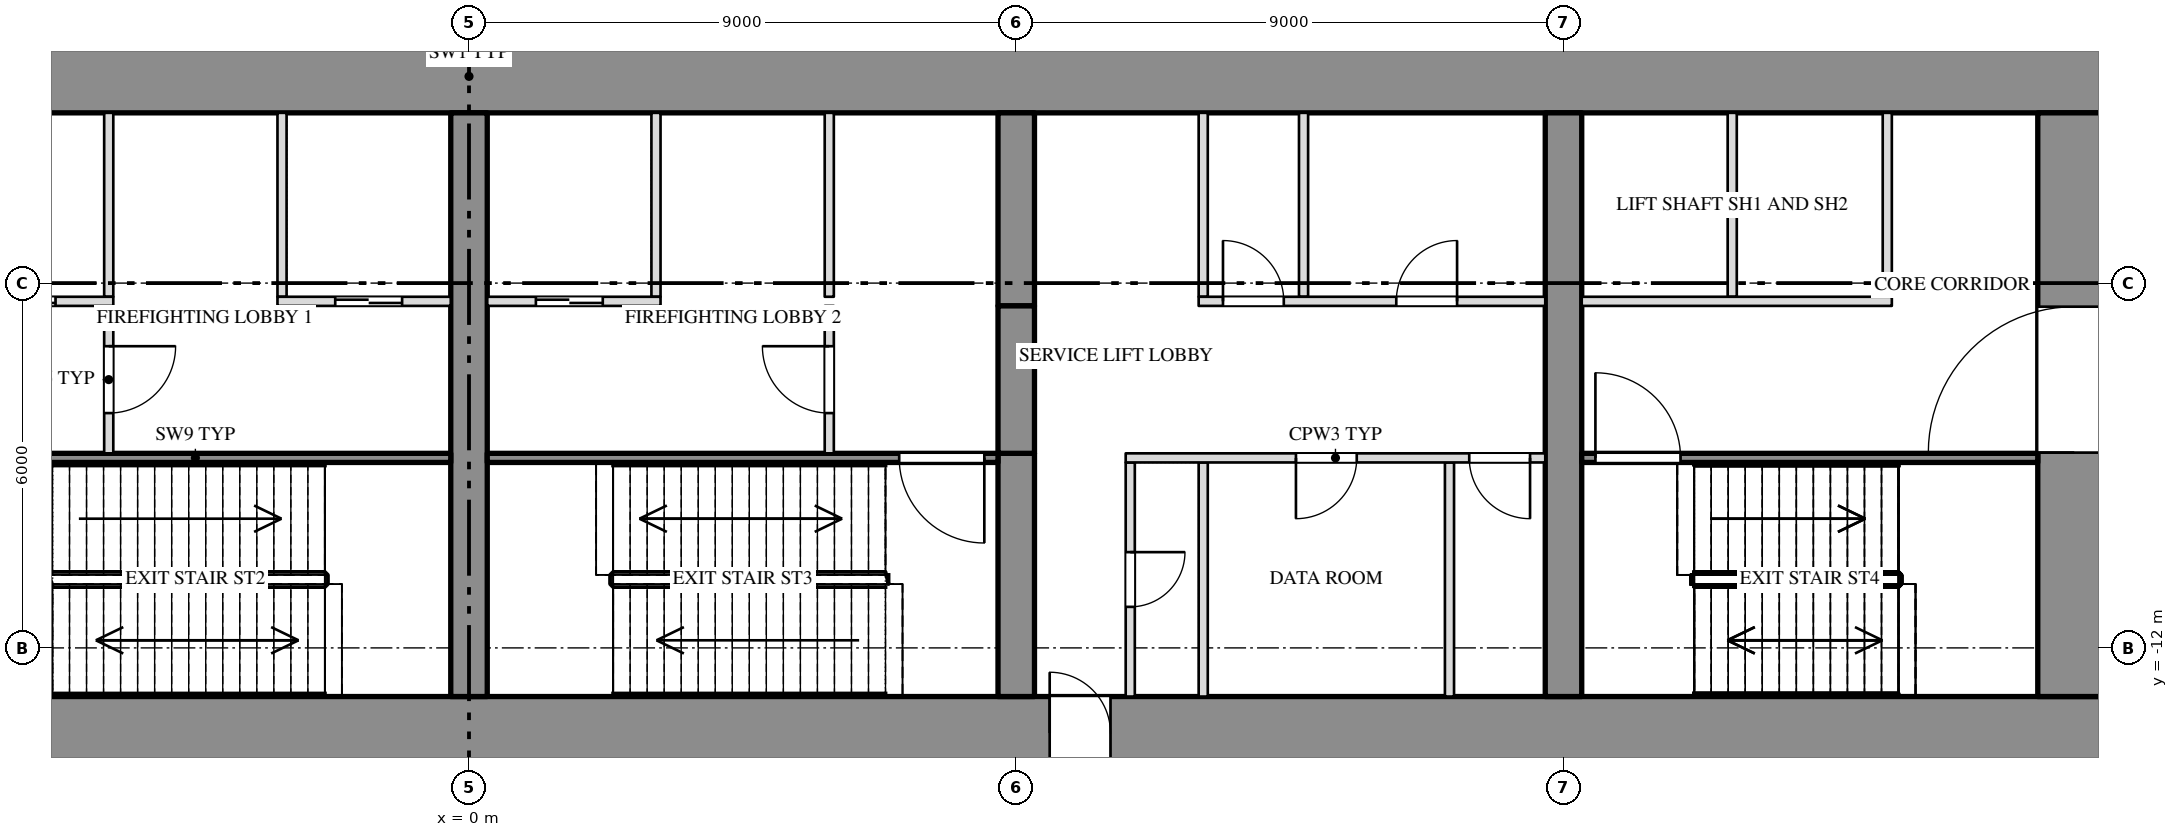
"""IFC4 building model, lengths in metres.
Left out: names, types, materials, properties, quantities, classifications, styles, units other than length and angle.
Written with IfcOpenShell. Run it as: python <this file> out.ifc"""

import sys

from ifc_helpers import new_model, si_unit, direction, frame, frame_2d, origin, place, context, subcontext, project, spatial, rectangle, extrude, element, fill, save


model = new_model("IFC4")
c1 = context("Model", 3, precision=1e-05, world=origin(), true_north=direction((0.0, 1.0)))
c2 = subcontext(c1, "Body", "Model", "MODEL_VIEW")
j1 = project(units=[si_unit("LENGTHUNIT", "METRE"), si_unit("PLANEANGLEUNIT", "RADIAN")], contexts=[c1])
p1 = place(None, origin())
s1 = spatial("IfcSite", under=j1, at=p1, CompositionType="ELEMENT")
p2 = place(p1, origin())
s2 = spatial("IfcBuilding", under=s1, at=p2, CompositionType="ELEMENT")
p3 = place(p2, frame((0.0, 0.0, 15.0)))
s3 = spatial("IfcBuildingStorey", under=s2, at=p3, CompositionType="ELEMENT", Elevation=15.0)
p4 = place(p3, frame((-27.0, -2.6, 0.0), z_axis=(0.0, 0.0, 1.0), x_axis=(1.0, 0.0, 0.0)))
e1 = element("IfcWall", 1, at=p4, inside=s3, PredefinedType="SHEAR", context=c2, shape_type="SweptSolid", body=[
    extrude(rectangle(XDim=54.0, YDim=1.2, at=frame_2d((27.0, 0.0))), origin(), (0.0, 0.0, 1.0), 5.7),
])
p5 = place(p3, frame((-27.0, -13.4, 0.0), z_axis=(0.0, 0.0, 1.0), x_axis=(1.0, 0.0, 0.0)))
e2 = element("IfcWall", 2, at=p5, inside=s3, PredefinedType="SHEAR", context=c2, shape_type="SweptSolid", body=[
    extrude(rectangle(XDim=54.0, YDim=1.2, at=frame_2d((27.0, 0.0))), origin(), (0.0, 0.0, 1.0), 5.7),
])
p6 = place(p5, frame((16.45, 0.0, 0.0)))
e3 = element("IfcOpeningElement", 3, at=p6, cuts=e2, PredefinedType="OPENING", context=c2, shape_type="SweptSolid", body=[
    extrude(rectangle(XDim=1.0, YDim=2.1, at=frame_2d((0.5, 1.05))), frame((0.0, 0.612, 0.0), z_axis=(0.0, -1.0, 0.0), x_axis=(1.0, 0.0, 0.0)), (0.0, 0.0, 1.0), 1.224),
])
p7 = place(p5, frame((36.55, 0.0, 0.0)))
e4 = element("IfcOpeningElement", 4, at=p7, cuts=e2, PredefinedType="OPENING", context=c2, shape_type="SweptSolid", body=[
    extrude(rectangle(XDim=1.0, YDim=2.1, at=frame_2d((0.5, 1.05))), frame((0.0, 0.612, 0.0), z_axis=(0.0, -1.0, 0.0), x_axis=(1.0, 0.0, 0.0)), (0.0, 0.0, 1.0), 1.224),
])
p8 = place(p3, frame((26.4, -12.8, 0.0), z_axis=(0.0, 0.0, 1.0), x_axis=(0.0, 1.0, 0.0)))
e5 = element("IfcWall", 5, at=p8, inside=s3, PredefinedType="SHEAR", context=c2, shape_type="SweptSolid", body=[
    extrude(rectangle(XDim=9.6, YDim=1.2, at=frame_2d((4.8, 0.0))), origin(), (0.0, 0.0, 1.0), 5.7),
])
p9 = place(p8, frame((4.012, 0.0, 0.0)))
e6 = element("IfcOpeningElement", 6, at=p9, cuts=e5, PredefinedType="OPENING", context=c2, shape_type="SweptSolid", body=[
    extrude(rectangle(XDim=2.4, YDim=2.1, at=frame_2d((1.2, 1.05))), frame((0.0, 0.612, 0.0), z_axis=(0.0, -1.0, 0.0), x_axis=(1.0, 0.0, 0.0)), (0.0, 0.0, 1.0), 1.224),
])
p10 = place(p3, frame((0.0, -12.8, 0.0), z_axis=(0.0, 0.0, 1.0), x_axis=(0.0, 1.0, 0.0)))
e7 = element("IfcWall", 7, at=p10, inside=s3, PredefinedType="SHEAR", context=c2, shape_type="SweptSolid", body=[
    extrude(rectangle(XDim=9.6, YDim=0.6, at=frame_2d((4.8, 0.0))), origin(), (0.0, 0.0, 1.0), 5.7),
])
p11 = place(p3, frame((9.0, -12.8, 0.0), z_axis=(0.0, 0.0, 1.0), x_axis=(0.0, 1.0, 0.0)))
e8 = element("IfcWall", 8, at=p11, inside=s3, PredefinedType="SHEAR", context=c2, shape_type="SweptSolid", body=[
    extrude(rectangle(XDim=4.0, YDim=0.6, at=frame_2d((2.0, 0.0))), origin(), (0.0, 0.0, 1.0), 5.7),
])
p12 = place(p3, frame((9.0, -6.375, 0.0), z_axis=(0.0, 0.0, 1.0), x_axis=(0.0, 1.0, 0.0)))
e9 = element("IfcWall", 9, at=p12, inside=s3, PredefinedType="SHEAR", context=c2, shape_type="SweptSolid", body=[
    extrude(rectangle(XDim=3.175, YDim=0.6, at=frame_2d((1.587, 0.0))), origin(), (0.0, 0.0, 1.0), 5.7),
])
p13 = place(p3, frame((9.0, -8.8, 3.6), z_axis=(0.0, 0.0, 1.0), x_axis=(0.0, 1.0, 0.0)))
e10 = element("IfcWall", 10, at=p13, inside=s3, PredefinedType="SHEAR", context=c2, shape_type="SweptSolid", body=[
    extrude(rectangle(XDim=2.425, YDim=0.6, at=frame_2d((1.212, 0.0))), origin(), (0.0, 0.0, 1.0), 2.1),
])
p14 = place(p3, frame((18.0, -12.8, 0.0), z_axis=(0.0, 0.0, 1.0), x_axis=(0.0, 1.0, 0.0)))
e11 = element("IfcWall", 11, at=p14, inside=s3, PredefinedType="SHEAR", context=c2, shape_type="SweptSolid", body=[
    extrude(rectangle(XDim=9.6, YDim=0.6, at=frame_2d((4.8, 0.0))), origin(), (0.0, 0.0, 1.0), 5.7),
])
for number, where, z_axis, x_axis in (
    (12, (-3.075, -6.225, 0.0), (0.0, 0.0, 1.0), (0.0, 1.0, 0.0)),
    (13, (-5.925, -6.225, 0.0), (0.0, 0.0, 1.0), (0.0, 1.0, 0.0)),
    (14, (3.075, -6.225, 0.0), (0.0, 0.0, 1.0), (0.0, 1.0, 0.0)),
    (15, (5.925, -6.225, 0.0), (0.0, 0.0, 1.0), (0.0, 1.0, 0.0)),
    (16, (12.075, -6.225, 0.0), (0.0, 0.0, 1.0), (0.0, 1.0, 0.0)),
    (17, (13.725, -6.225, 0.0), (0.0, 0.0, 1.0), (0.0, 1.0, 0.0)),
    (18, (20.775, -6.225, 0.0), (0.0, 0.0, 1.0), (0.0, 1.0, 0.0)),
    (19, (23.325, -6.225, 0.0), (0.0, 0.0, 1.0), (0.0, 1.0, 0.0)),
):
    element("IfcWall", number, at=place(p3, frame(where, z_axis=z_axis, x_axis=x_axis)), inside=s3, PredefinedType="PARTITIONING", context=c2, shape_type="SweptSolid", body=[
        extrude(rectangle(XDim=3.025, YDim=0.15, at=frame_2d((1.513, 0.0))), origin(), (0.0, 0.0, 1.0), 5.7),
    ])
p15 = place(p3, frame((10.875, -12.8, 0.0), z_axis=(0.0, 0.0, 1.0), x_axis=(0.0, 1.0, 0.0)))
e20 = element("IfcWall", 20, at=p15, inside=s3, PredefinedType="PARTITIONING", context=c2, shape_type="SweptSolid", body=[
    extrude(rectangle(XDim=3.85, YDim=0.15, at=frame_2d((1.925, 0.0))), origin(), (0.0, 0.0, 1.0), 5.7),
])
p16 = place(p15, frame((1.475, 0.0, 0.0)))
e21 = element("IfcOpeningElement", 21, at=p16, cuts=e20, PredefinedType="OPENING", context=c2, shape_type="SweptSolid", body=[
    extrude(rectangle(XDim=0.9, YDim=2.1, at=frame_2d((0.45, 1.05))), frame((0.0, 0.087, 0.0), z_axis=(0.0, -1.0, 0.0), x_axis=(1.0, 0.0, 0.0)), (0.0, 0.0, 1.0), 0.174),
])
for number, where, z_axis, x_axis in (
    (22, (12.075, -12.8, 0.0), (0.0, 0.0, 1.0), (0.0, 1.0, 0.0)),
    (23, (16.125, -12.8, 0.0), (0.0, 0.0, 1.0), (0.0, 1.0, 0.0)),
):
    element("IfcWall", number, at=place(p3, frame(where, z_axis=z_axis, x_axis=x_axis)), inside=s3, PredefinedType="PARTITIONING", context=c2, shape_type="SweptSolid", body=[
        extrude(rectangle(XDim=3.85, YDim=0.15, at=frame_2d((1.925, 0.0))), origin(), (0.0, 0.0, 1.0), 5.7),
    ])
p17 = place(p3, frame((-5.925, -8.8, 0.0), z_axis=(0.0, 0.0, 1.0), x_axis=(0.0, 1.0, 0.0)))
e24 = element("IfcWall", 24, at=p17, inside=s3, PredefinedType="PARTITIONING", context=c2, shape_type="SweptSolid", body=[
    extrude(rectangle(XDim=2.425, YDim=0.15, at=frame_2d((1.212, 0.0))), origin(), (0.0, 0.0, 1.0), 5.7),
])
p18 = place(p17, frame((0.662, 0.0, 0.0)))
e25 = element("IfcOpeningElement", 25, at=p18, cuts=e24, PredefinedType="OPENING", context=c2, shape_type="SweptSolid", body=[
    extrude(rectangle(XDim=1.1, YDim=2.1, at=frame_2d((0.55, 1.05))), frame((0.0, 0.087, 0.0), z_axis=(0.0, -1.0, 0.0), x_axis=(1.0, 0.0, 0.0)), (0.0, 0.0, 1.0), 0.174),
])
p19 = place(p3, frame((5.925, -8.8, 0.0), z_axis=(0.0, 0.0, 1.0), x_axis=(0.0, 1.0, 0.0)))
e26 = element("IfcWall", 26, at=p19, inside=s3, PredefinedType="PARTITIONING", context=c2, shape_type="SweptSolid", body=[
    extrude(rectangle(XDim=2.425, YDim=0.15, at=frame_2d((1.212, 0.0))), origin(), (0.0, 0.0, 1.0), 5.7),
])
p20 = place(p19, frame((0.662, 0.0, 0.0)))
e27 = element("IfcOpeningElement", 27, at=p20, cuts=e26, PredefinedType="OPENING", context=c2, shape_type="SweptSolid", body=[
    extrude(rectangle(XDim=1.1, YDim=2.1, at=frame_2d((0.55, 1.05))), frame((0.0, 0.087, 0.0), z_axis=(0.0, -1.0, 0.0), x_axis=(1.0, 0.0, 0.0)), (0.0, 0.0, 1.0), 0.174),
])
p21 = place(p3, frame((-8.7, -6.3, 0.0), z_axis=(0.0, 0.0, 1.0), x_axis=(1.0, 0.0, 0.0)))
e28 = element("IfcWall", 28, at=p21, inside=s3, PredefinedType="PARTITIONING", context=c2, shape_type="SweptSolid", body=[
    extrude(rectangle(XDim=2.85, YDim=0.15, at=frame_2d((1.425, 0.0))), origin(), (0.0, 0.0, 1.0), 5.7),
])
p22 = place(p21, frame((0.8, 0.0, 0.0)))
e29 = element("IfcOpeningElement", 29, at=p22, cuts=e28, PredefinedType="OPENING", context=c2, shape_type="SweptSolid", body=[
    extrude(rectangle(XDim=1.1, YDim=2.1, at=frame_2d((0.55, 1.05))), frame((0.0, 0.087, 0.0), z_axis=(0.0, -1.0, 0.0), x_axis=(1.0, 0.0, 0.0)), (0.0, 0.0, 1.0), 0.174),
])
p23 = place(p3, frame((-3.15, -6.3, 0.0), z_axis=(0.0, 0.0, 1.0), x_axis=(1.0, 0.0, 0.0)))
e30 = element("IfcWall", 30, at=p23, inside=s3, PredefinedType="PARTITIONING", context=c2, shape_type="SweptSolid", body=[
    extrude(rectangle(XDim=2.85, YDim=0.15, at=frame_2d((1.425, 0.0))), origin(), (0.0, 0.0, 1.0), 5.7),
])
p24 = place(p23, frame((0.95, 0.0, 0.0)))
e31 = element("IfcOpeningElement", 31, at=p24, cuts=e30, PredefinedType="OPENING", context=c2, shape_type="SweptSolid", body=[
    extrude(rectangle(XDim=1.1, YDim=2.1, at=frame_2d((0.55, 1.05))), frame((0.0, 0.087, 0.0), z_axis=(0.0, -1.0, 0.0), x_axis=(1.0, 0.0, 0.0)), (0.0, 0.0, 1.0), 0.174),
])
p25 = place(p3, frame((0.3, -6.3, 0.0), z_axis=(0.0, 0.0, 1.0), x_axis=(1.0, 0.0, 0.0)))
e32 = element("IfcWall", 32, at=p25, inside=s3, PredefinedType="PARTITIONING", context=c2, shape_type="SweptSolid", body=[
    extrude(rectangle(XDim=2.85, YDim=0.15, at=frame_2d((1.425, 0.0))), origin(), (0.0, 0.0, 1.0), 5.7),
])
p26 = place(p25, frame((0.8, 0.0, 0.0)))
e33 = element("IfcOpeningElement", 33, at=p26, cuts=e32, PredefinedType="OPENING", context=c2, shape_type="SweptSolid", body=[
    extrude(rectangle(XDim=1.1, YDim=2.1, at=frame_2d((0.55, 1.05))), frame((0.0, 0.087, 0.0), z_axis=(0.0, -1.0, 0.0), x_axis=(1.0, 0.0, 0.0)), (0.0, 0.0, 1.0), 0.174),
])
p27 = place(p3, frame((12.0, -6.3, 0.0), z_axis=(0.0, 0.0, 1.0), x_axis=(1.0, 0.0, 0.0)))
e34 = element("IfcWall", 34, at=p27, inside=s3, PredefinedType="PARTITIONING", context=c2, shape_type="SweptSolid", body=[
    extrude(rectangle(XDim=5.7, YDim=0.15, at=frame_2d((2.85, 0.0))), origin(), (0.0, 0.0, 1.0), 5.7),
])
p28 = place(p27, frame((0.4, 0.0, 0.0)))
e35 = element("IfcOpeningElement", 35, at=p28, cuts=e34, PredefinedType="OPENING", context=c2, shape_type="SweptSolid", body=[
    extrude(rectangle(XDim=1.0, YDim=2.1, at=frame_2d((0.5, 1.05))), frame((0.0, 0.087, 0.0), z_axis=(0.0, -1.0, 0.0), x_axis=(1.0, 0.0, 0.0)), (0.0, 0.0, 1.0), 0.174),
])
p29 = place(p27, frame((3.25, 0.0, 0.0)))
e36 = element("IfcOpeningElement", 36, at=p29, cuts=e34, PredefinedType="OPENING", context=c2, shape_type="SweptSolid", body=[
    extrude(rectangle(XDim=1.0, YDim=2.1, at=frame_2d((0.5, 1.05))), frame((0.0, 0.087, 0.0), z_axis=(0.0, -1.0, 0.0), x_axis=(1.0, 0.0, 0.0)), (0.0, 0.0, 1.0), 0.174),
])
p30 = place(p3, frame((18.3, -6.3, 0.0), z_axis=(0.0, 0.0, 1.0), x_axis=(1.0, 0.0, 0.0)))
e37 = element("IfcWall", 37, at=p30, inside=s3, PredefinedType="PARTITIONING", context=c2, shape_type="SweptSolid", body=[
    extrude(rectangle(XDim=5.1, YDim=0.15, at=frame_2d((2.55, 0.0))), origin(), (0.0, 0.0, 1.0), 5.7),
])
p31 = place(p3, frame((-8.7, -8.875, 0.0), z_axis=(0.0, 0.0, 1.0), x_axis=(1.0, 0.0, 0.0)))
e38 = element("IfcWall", 38, at=p31, inside=s3, PredefinedType="SHEAR", context=c2, shape_type="SweptSolid", body=[
    extrude(rectangle(XDim=8.4, YDim=0.15, at=frame_2d((4.2, 0.0))), origin(), (0.0, 0.0, 1.0), 5.7),
])
p32 = place(p31, frame((0.225, 0.0, 0.0)))
e39 = element("IfcOpeningElement", 39, at=p32, cuts=e38, PredefinedType="OPENING", context=c2, shape_type="SweptSolid", body=[
    extrude(rectangle(XDim=1.4, YDim=2.1, at=frame_2d((0.7, 1.05))), frame((0.0, 0.087, 0.0), z_axis=(0.0, -1.0, 0.0), x_axis=(1.0, 0.0, 0.0)), (0.0, 0.0, 1.0), 0.174),
])
p33 = place(p3, frame((0.3, -8.875, 0.0), z_axis=(0.0, 0.0, 1.0), x_axis=(1.0, 0.0, 0.0)))
e40 = element("IfcWall", 40, at=p33, inside=s3, PredefinedType="SHEAR", context=c2, shape_type="SweptSolid", body=[
    extrude(rectangle(XDim=8.4, YDim=0.15, at=frame_2d((4.2, 0.0))), origin(), (0.0, 0.0, 1.0), 5.7),
])
p34 = place(p33, frame((6.775, 0.0, 0.0)))
e41 = element("IfcOpeningElement", 41, at=p34, cuts=e40, PredefinedType="OPENING", context=c2, shape_type="SweptSolid", body=[
    extrude(rectangle(XDim=1.4, YDim=2.1, at=frame_2d((0.7, 1.05))), frame((0.0, 0.087, 0.0), z_axis=(0.0, -1.0, 0.0), x_axis=(1.0, 0.0, 0.0)), (0.0, 0.0, 1.0), 0.174),
])
p35 = place(p3, frame((10.8, -8.875, 0.0), z_axis=(0.0, 0.0, 1.0), x_axis=(1.0, 0.0, 0.0)))
e42 = element("IfcWall", 42, at=p35, inside=s3, PredefinedType="PARTITIONING", context=c2, shape_type="SweptSolid", body=[
    extrude(rectangle(XDim=6.9, YDim=0.15, at=frame_2d((3.45, 0.0))), origin(), (0.0, 0.0, 1.0), 5.7),
])
p36 = place(p35, frame((2.8, 0.0, 0.0)))
e43 = element("IfcOpeningElement", 43, at=p36, cuts=e42, PredefinedType="OPENING", context=c2, shape_type="SweptSolid", body=[
    extrude(rectangle(XDim=1.0, YDim=2.1, at=frame_2d((0.5, 1.05))), frame((0.0, 0.087, 0.0), z_axis=(0.0, -1.0, 0.0), x_axis=(1.0, 0.0, 0.0)), (0.0, 0.0, 1.0), 0.174),
])
p37 = place(p35, frame((5.65, 0.0, 0.0)))
e44 = element("IfcOpeningElement", 44, at=p37, cuts=e42, PredefinedType="OPENING", context=c2, shape_type="SweptSolid", body=[
    extrude(rectangle(XDim=1.0, YDim=2.1, at=frame_2d((0.5, 1.05))), frame((0.0, 0.087, 0.0), z_axis=(0.0, -1.0, 0.0), x_axis=(1.0, 0.0, 0.0)), (0.0, 0.0, 1.0), 0.174),
])
p38 = place(p3, frame((18.3, -8.875, 0.0), z_axis=(0.0, 0.0, 1.0), x_axis=(1.0, 0.0, 0.0)))
e45 = element("IfcWall", 45, at=p38, inside=s3, PredefinedType="SHEAR", context=c2, shape_type="SweptSolid", body=[
    extrude(rectangle(XDim=7.5, YDim=0.15, at=frame_2d((3.75, 0.0))), origin(), (0.0, 0.0, 1.0), 5.7),
])
p39 = place(p38, frame((0.225, 0.0, 0.0)))
e46 = element("IfcOpeningElement", 46, at=p39, cuts=e45, PredefinedType="OPENING", context=c2, shape_type="SweptSolid", body=[
    extrude(rectangle(XDim=1.4, YDim=2.1, at=frame_2d((0.7, 1.05))), frame((0.0, 0.087, 0.0), z_axis=(0.0, -1.0, 0.0), x_axis=(1.0, 0.0, 0.0)), (0.0, 0.0, 1.0), 0.174),
])
p40 = place(p22, origin())
e47 = element("IfcDoor", 47, at=p40, inside=s3, OperationType="SLIDING_TO_LEFT", PredefinedType="DOOR", context=c2, shape_type="SweptSolid", body=[
    extrude(rectangle(XDim=1.1, YDim=2.1, at=frame_2d((0.55, 1.05))), frame((0.0, 0.025, 0.0), z_axis=(0.0, -1.0, 0.0), x_axis=(1.0, 0.0, 0.0)), (0.0, 0.0, 1.0), 0.05),
])
fill(e29, e47)
p41 = place(p18, origin())
e48 = element("IfcDoor", 48, at=p41, inside=s3, OperationType="SINGLE_SWING_LEFT", PredefinedType="DOOR", context=c2, shape_type="SweptSolid", body=[
    extrude(rectangle(XDim=1.1, YDim=2.1, at=frame_2d((0.55, 1.05))), frame((0.0, 0.025, 0.0), z_axis=(0.0, -1.0, 0.0), x_axis=(1.0, 0.0, 0.0)), (0.0, 0.0, 1.0), 0.05),
])
fill(e25, e48)
p42 = place(p24, origin())
e49 = element("IfcDoor", 49, at=p42, inside=s3, OperationType="SLIDING_TO_LEFT", PredefinedType="DOOR", context=c2, shape_type="SweptSolid", body=[
    extrude(rectangle(XDim=1.1, YDim=2.1, at=frame_2d((0.55, 1.05))), frame((0.0, 0.025, 0.0), z_axis=(0.0, -1.0, 0.0), x_axis=(1.0, 0.0, 0.0)), (0.0, 0.0, 1.0), 0.05),
])
fill(e31, e49)
p43 = place(p26, origin())
e50 = element("IfcDoor", 50, at=p43, inside=s3, OperationType="SLIDING_TO_RIGHT", PredefinedType="DOOR", context=c2, shape_type="SweptSolid", body=[
    extrude(rectangle(XDim=1.1, YDim=2.1, at=frame_2d((0.55, 1.05))), frame((0.0, 0.025, 0.0), z_axis=(0.0, -1.0, 0.0), x_axis=(1.0, 0.0, 0.0)), (0.0, 0.0, 1.0), 0.05),
])
fill(e33, e50)
p44 = place(p20, origin())
e51 = element("IfcDoor", 51, at=p44, inside=s3, OperationType="SINGLE_SWING_RIGHT", PredefinedType="DOOR", context=c2, shape_type="SweptSolid", body=[
    extrude(rectangle(XDim=1.1, YDim=2.1, at=frame_2d((0.55, 1.05))), frame((0.0, 0.025, 0.0), z_axis=(0.0, -1.0, 0.0), x_axis=(1.0, 0.0, 0.0)), (0.0, 0.0, 1.0), 0.05),
])
fill(e27, e51)
p45 = place(p34, origin())
e52 = element("IfcDoor", 52, at=p45, inside=s3, OperationType="DOUBLE_DOOR_SINGLE_SWING", PredefinedType="DOOR", context=c2, shape_type="SweptSolid", body=[
    extrude(rectangle(XDim=1.4, YDim=2.1, at=frame_2d((0.7, 1.05))), frame((0.0, 0.025, 0.0), z_axis=(0.0, -1.0, 0.0), x_axis=(1.0, 0.0, 0.0)), (0.0, 0.0, 1.0), 0.05),
])
fill(e41, e52)
p46 = place(p7, origin())
e53 = element("IfcDoor", 53, at=p46, inside=s3, OperationType="SINGLE_SWING_LEFT", PredefinedType="DOOR", context=c2, shape_type="SweptSolid", body=[
    extrude(rectangle(XDim=1.0, YDim=2.1, at=frame_2d((0.5, 1.05))), frame((0.0, 0.025, 0.0), z_axis=(0.0, -1.0, 0.0), x_axis=(1.0, 0.0, 0.0)), (0.0, 0.0, 1.0), 0.05),
])
fill(e4, e53)
p47 = place(p16, origin())
e54 = element("IfcDoor", 54, at=p47, inside=s3, OperationType="SINGLE_SWING_LEFT", PredefinedType="DOOR", context=c2, shape_type="SweptSolid", body=[
    extrude(rectangle(XDim=0.9, YDim=2.1, at=frame_2d((0.45, 1.05))), frame((0.0, 0.025, 0.0), z_axis=(0.0, -1.0, 0.0), x_axis=(1.0, 0.0, 0.0)), (0.0, 0.0, 1.0), 0.05),
])
fill(e21, e54)
p48 = place(p28, origin())
e55 = element("IfcDoor", 55, at=p48, inside=s3, OperationType="SINGLE_SWING_LEFT", PredefinedType="DOOR", context=c2, shape_type="SweptSolid", body=[
    extrude(rectangle(XDim=1.0, YDim=2.1, at=frame_2d((0.5, 1.05))), frame((0.0, 0.025, 0.0), z_axis=(0.0, -1.0, 0.0), x_axis=(1.0, 0.0, 0.0)), (0.0, 0.0, 1.0), 0.05),
])
fill(e35, e55)
p49 = place(p36, origin())
e56 = element("IfcDoor", 56, at=p49, inside=s3, OperationType="SINGLE_SWING_RIGHT", PredefinedType="DOOR", context=c2, shape_type="SweptSolid", body=[
    extrude(rectangle(XDim=1.0, YDim=2.1, at=frame_2d((0.5, 1.05))), frame((0.0, 0.025, 0.0), z_axis=(0.0, -1.0, 0.0), x_axis=(1.0, 0.0, 0.0)), (0.0, 0.0, 1.0), 0.05),
])
fill(e43, e56)
p50 = place(p29, origin())
e57 = element("IfcDoor", 57, at=p50, inside=s3, OperationType="SINGLE_SWING_RIGHT", PredefinedType="DOOR", context=c2, shape_type="SweptSolid", body=[
    extrude(rectangle(XDim=1.0, YDim=2.1, at=frame_2d((0.5, 1.05))), frame((0.0, 0.025, 0.0), z_axis=(0.0, -1.0, 0.0), x_axis=(1.0, 0.0, 0.0)), (0.0, 0.0, 1.0), 0.05),
])
fill(e36, e57)
p51 = place(p37, origin())
e58 = element("IfcDoor", 58, at=p51, inside=s3, OperationType="SINGLE_SWING_LEFT", PredefinedType="DOOR", context=c2, shape_type="SweptSolid", body=[
    extrude(rectangle(XDim=1.0, YDim=2.1, at=frame_2d((0.5, 1.05))), frame((0.0, 0.025, 0.0), z_axis=(0.0, -1.0, 0.0), x_axis=(1.0, 0.0, 0.0)), (0.0, 0.0, 1.0), 0.05),
])
fill(e44, e58)
p52 = place(p39, origin())
e59 = element("IfcDoor", 59, at=p52, inside=s3, OperationType="DOUBLE_DOOR_SINGLE_SWING", PredefinedType="DOOR", context=c2, shape_type="SweptSolid", body=[
    extrude(rectangle(XDim=1.4, YDim=2.1, at=frame_2d((0.7, 1.05))), frame((0.0, 0.025, 0.0), z_axis=(0.0, -1.0, 0.0), x_axis=(1.0, 0.0, 0.0)), (0.0, 0.0, 1.0), 0.05),
])
fill(e46, e59)
p53 = place(p9, origin())
e60 = element("IfcDoor", 60, at=p53, inside=s3, OperationType="DOUBLE_DOOR_SINGLE_SWING", PredefinedType="DOOR", context=c2, shape_type="SweptSolid", body=[
    extrude(rectangle(XDim=2.4, YDim=2.1, at=frame_2d((1.2, 1.05))), frame((0.0, 0.025, 0.0), z_axis=(0.0, -1.0, 0.0), x_axis=(1.0, 0.0, 0.0)), (0.0, 0.0, 1.0), 0.05),
])
fill(e6, e60)
save(model, sys.argv[1])
